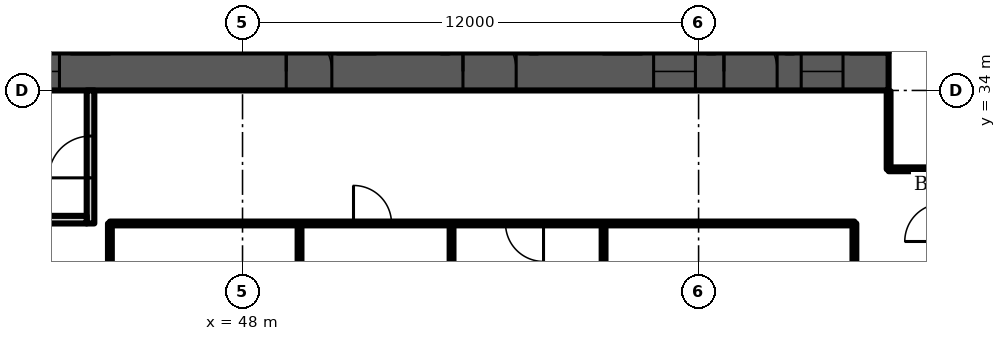
"""IFC4 building model, lengths in metres.
Left out: names, types, materials, properties, quantities, classifications, styles, units other than length and angle.
Written with IfcOpenShell. Run it as: python <this file> out.ifc"""

import sys

from ifc_helpers import new_model, si_unit, direction, frame, frame_2d, origin, place, context, subcontext, project, spatial, rectangle, extrude, element, fill, save


model = new_model("IFC4")
c1 = context("Model", 3, precision=1e-05, world=origin(), true_north=direction((0.0, 1.0)))
c2 = subcontext(c1, "Body", "Model", "MODEL_VIEW")
j1 = project(units=[si_unit("LENGTHUNIT", "METRE"), si_unit("PLANEANGLEUNIT", "RADIAN")], contexts=[c1])
p1 = place(None, origin())
s1 = spatial("IfcSite", under=j1, at=p1, CompositionType="ELEMENT")
p2 = place(p1, origin())
s2 = spatial("IfcBuilding", under=s1, at=p2, CompositionType="ELEMENT")
p3 = place(p2, frame((0.0, 0.0, 121.9)))
s3 = spatial("IfcBuildingStorey", under=s2, at=p3, CompositionType="ELEMENT", Elevation=121.9)
p4 = place(p3, frame((16.0, 34.5, 0.0), z_axis=(0.0, 0.0, 1.0), x_axis=(1.0, 0.0, 0.0)))
e1 = element("IfcWall", 1, at=p4, inside=s3, PredefinedType="SHEAR", context=c2, shape_type="SweptSolid", body=[
    extrude(rectangle(XDim=49.0, YDim=1.0, at=frame_2d((24.5, 0.0))), origin(), (0.0, 0.0, 1.0), 3.6),
])
p5 = place(p4, frame((1.2, 0.0, 0.0)))
e2 = element("IfcOpeningElement", 2, at=p5, cuts=e1, PredefinedType="OPENING", context=c2, shape_type="SweptSolid", body=[
    extrude(rectangle(XDim=1.1, YDim=2.1, at=frame_2d((0.55, 1.05))), frame((0.0, 0.51, 0.0), z_axis=(0.0, -1.0, 0.0), x_axis=(1.0, 0.0, 0.0)), (0.0, 0.0, 1.0), 1.02),
])
p6 = place(p4, frame((5.083, 0.0, 0.0)))
e3 = element("IfcOpeningElement", 3, at=p6, cuts=e1, PredefinedType="OPENING", context=c2, shape_type="SweptSolid", body=[
    extrude(rectangle(XDim=1.1, YDim=2.1, at=frame_2d((0.55, 1.05))), frame((0.0, 0.51, 0.0), z_axis=(0.0, -1.0, 0.0), x_axis=(1.0, 0.0, 0.0)), (0.0, 0.0, 1.0), 1.02),
])
p7 = place(p4, frame((2.933, 0.0, 0.0)))
e4 = element("IfcOpeningElement", 4, at=p7, cuts=e1, PredefinedType="OPENING", context=c2, shape_type="SweptSolid", body=[
    extrude(rectangle(XDim=1.4, YDim=2.1, at=frame_2d((0.7, 1.05))), frame((0.0, 0.51, 0.0), z_axis=(0.0, -1.0, 0.0), x_axis=(1.0, 0.0, 0.0)), (0.0, 0.0, 1.0), 1.02),
])
p8 = place(p4, frame((7.65, 0.0, 0.0)))
e5 = element("IfcOpeningElement", 5, at=p8, cuts=e1, PredefinedType="OPENING", context=c2, shape_type="SweptSolid", body=[
    extrude(rectangle(XDim=1.2, YDim=2.1, at=frame_2d((0.6, 1.05))), frame((0.0, 0.51, 0.0), z_axis=(0.0, -1.0, 0.0), x_axis=(1.0, 0.0, 0.0)), (0.0, 0.0, 1.0), 1.02),
])
p9 = place(p4, frame((14.817, 0.0, 0.0)))
e6 = element("IfcOpeningElement", 6, at=p9, cuts=e1, PredefinedType="OPENING", context=c2, shape_type="SweptSolid", body=[
    extrude(rectangle(XDim=1.1, YDim=2.1, at=frame_2d((0.55, 1.05))), frame((0.0, 0.51, 0.0), z_axis=(0.0, -1.0, 0.0), x_axis=(1.0, 0.0, 0.0)), (0.0, 0.0, 1.0), 1.02),
])
p10 = place(p4, frame((19.083, 0.0, 0.0)))
e7 = element("IfcOpeningElement", 7, at=p10, cuts=e1, PredefinedType="OPENING", context=c2, shape_type="SweptSolid", body=[
    extrude(rectangle(XDim=1.1, YDim=2.1, at=frame_2d((0.55, 1.05))), frame((0.0, 0.51, 0.0), z_axis=(0.0, -1.0, 0.0), x_axis=(1.0, 0.0, 0.0)), (0.0, 0.0, 1.0), 1.02),
])
p11 = place(p4, frame((16.8, 0.0, 0.0)))
e8 = element("IfcOpeningElement", 8, at=p11, cuts=e1, PredefinedType="OPENING", context=c2, shape_type="SweptSolid", body=[
    extrude(rectangle(XDim=1.4, YDim=2.1, at=frame_2d((0.7, 1.05))), frame((0.0, 0.51, 0.0), z_axis=(0.0, -1.0, 0.0), x_axis=(1.0, 0.0, 0.0)), (0.0, 0.0, 1.0), 1.02),
])
p12 = place(p4, frame((21.817, 0.0, 0.0)))
e9 = element("IfcOpeningElement", 9, at=p12, cuts=e1, PredefinedType="OPENING", context=c2, shape_type="SweptSolid", body=[
    extrude(rectangle(XDim=1.1, YDim=2.1, at=frame_2d((0.55, 1.05))), frame((0.0, 0.51, 0.0), z_axis=(0.0, -1.0, 0.0), x_axis=(1.0, 0.0, 0.0)), (0.0, 0.0, 1.0), 1.02),
])
p13 = place(p4, frame((26.083, 0.0, 0.0)))
e10 = element("IfcOpeningElement", 10, at=p13, cuts=e1, PredefinedType="OPENING", context=c2, shape_type="SweptSolid", body=[
    extrude(rectangle(XDim=1.1, YDim=2.1, at=frame_2d((0.55, 1.05))), frame((0.0, 0.51, 0.0), z_axis=(0.0, -1.0, 0.0), x_axis=(1.0, 0.0, 0.0)), (0.0, 0.0, 1.0), 1.02),
])
p14 = place(p4, frame((33.15, 0.0, 0.0)))
e11 = element("IfcOpeningElement", 11, at=p14, cuts=e1, PredefinedType="OPENING", context=c2, shape_type="SweptSolid", body=[
    extrude(rectangle(XDim=1.2, YDim=2.1, at=frame_2d((0.6, 1.05))), frame((0.0, 0.51, 0.0), z_axis=(0.0, -1.0, 0.0), x_axis=(1.0, 0.0, 0.0)), (0.0, 0.0, 1.0), 1.02),
])
p15 = place(p4, frame((37.8, 0.0, 0.0)))
e12 = element("IfcOpeningElement", 12, at=p15, cuts=e1, PredefinedType="OPENING", context=c2, shape_type="SweptSolid", body=[
    extrude(rectangle(XDim=1.4, YDim=2.1, at=frame_2d((0.7, 1.05))), frame((0.0, 0.51, 0.0), z_axis=(0.0, -1.0, 0.0), x_axis=(1.0, 0.0, 0.0)), (0.0, 0.0, 1.0), 1.02),
])
p16 = place(p4, frame((42.817, 0.0, 0.0)))
e13 = element("IfcOpeningElement", 13, at=p16, cuts=e1, PredefinedType="OPENING", context=c2, shape_type="SweptSolid", body=[
    extrude(rectangle(XDim=1.1, YDim=2.1, at=frame_2d((0.55, 1.05))), frame((0.0, 0.51, 0.0), z_axis=(0.0, -1.0, 0.0), x_axis=(1.0, 0.0, 0.0)), (0.0, 0.0, 1.0), 1.02),
])
p17 = place(p4, frame((46.7, 0.0, 0.0)))
e14 = element("IfcOpeningElement", 14, at=p17, cuts=e1, PredefinedType="OPENING", context=c2, shape_type="SweptSolid", body=[
    extrude(rectangle(XDim=1.1, YDim=2.1, at=frame_2d((0.55, 1.05))), frame((0.0, 0.51, 0.0), z_axis=(0.0, -1.0, 0.0), x_axis=(1.0, 0.0, 0.0)), (0.0, 0.0, 1.0), 1.02),
])
p18 = place(p4, frame((44.667, 0.0, 0.0)))
e15 = element("IfcOpeningElement", 15, at=p18, cuts=e1, PredefinedType="OPENING", context=c2, shape_type="SweptSolid", body=[
    extrude(rectangle(XDim=1.4, YDim=2.1, at=frame_2d((0.7, 1.05))), frame((0.0, 0.51, 0.0), z_axis=(0.0, -1.0, 0.0), x_axis=(1.0, 0.0, 0.0)), (0.0, 0.0, 1.0), 1.02),
])
p19 = place(p3, frame((44.0, 30.5, 0.0), z_axis=(0.0, 0.0, 1.0), x_axis=(0.0, 1.0, 0.0)))
e16 = element("IfcWall", 16, at=p19, inside=s3, PredefinedType="PARTITIONING", context=c2, shape_type="SweptSolid", body=[
    extrude(rectangle(XDim=3.5, YDim=0.2, at=frame_2d((1.75, 0.0))), origin(), (0.0, 0.0, 1.0), 3.2),
])
p20 = place(p19, frame((1.2, 0.0, 0.0)))
e17 = element("IfcOpeningElement", 17, at=p20, cuts=e16, PredefinedType="OPENING", context=c2, shape_type="SweptSolid", body=[
    extrude(rectangle(XDim=1.1, YDim=2.1, at=frame_2d((0.55, 1.05))), frame((0.0, 0.11, 0.0), z_axis=(0.0, -1.0, 0.0), x_axis=(1.0, 0.0, 0.0)), (0.0, 0.0, 1.0), 0.22),
])
p21 = place(p3, frame((41.1, 30.6, 0.0), z_axis=(0.0, 0.0, 1.0), x_axis=(1.0, 0.0, 0.0)))
e18 = element("IfcWall", 18, at=p21, inside=s3, PredefinedType="PARTITIONING", context=c2, shape_type="SweptSolid", body=[
    extrude(rectangle(XDim=2.8, YDim=0.2, at=frame_2d((1.4, 0.0))), origin(), (0.0, 0.0, 1.0), 3.2),
])
p22 = place(p3, frame((44.51, 8.437, 0.0), z_axis=(0.0, 0.0, 1.0), x_axis=(0.0, 1.0, 0.0)))
e19 = element("IfcWall", 19, at=p22, inside=s3, PredefinedType="PARTITIONING", context=c2, shape_type="SweptSolid", body=[
    extrude(rectangle(XDim=22.063, YDim=0.1, at=frame_2d((11.031, 0.0))), origin(), (0.0, 0.0, 1.0), 3.2),
])
p23 = place(p22, frame((12.683, 0.0, 0.0)))
e20 = element("IfcOpeningElement", 20, at=p23, cuts=e19, PredefinedType="OPENING", context=c2, shape_type="SweptSolid", body=[
    extrude(rectangle(XDim=1.8, YDim=2.1, at=frame_2d((0.9, 1.05))), frame((0.0, 0.06, 0.0), z_axis=(0.0, -1.0, 0.0), x_axis=(1.0, 0.0, 0.0)), (0.0, 0.0, 1.0), 0.12),
])
p24 = place(p3, frame((44.51, 30.5, 0.0), z_axis=(0.0, 0.0, 1.0), x_axis=(1.0, 0.0, 0.0)))
e21 = element("IfcWall", 21, at=p24, inside=s3, PredefinedType="PARTITIONING", context=c2, shape_type="SweptSolid", body=[
    extrude(rectangle(XDim=19.59, YDim=0.1, at=frame_2d((9.795, 0.0))), origin(), (0.0, 0.0, 1.0), 3.2),
])
p25 = place(p24, frame((6.41, 0.0, 0.0)))
e22 = element("IfcOpeningElement", 22, at=p25, cuts=e21, PredefinedType="OPENING", context=c2, shape_type="SweptSolid", body=[
    extrude(rectangle(XDim=1.0, YDim=2.1, at=frame_2d((0.5, 1.05))), frame((0.0, 0.06, 0.0), z_axis=(0.0, -1.0, 0.0), x_axis=(1.0, 0.0, 0.0)), (0.0, 0.0, 1.0), 0.12),
])
p26 = place(p24, frame((10.41, 0.0, 0.0)))
e23 = element("IfcOpeningElement", 23, at=p26, cuts=e21, PredefinedType="OPENING", context=c2, shape_type="SweptSolid", body=[
    extrude(rectangle(XDim=1.0, YDim=2.1, at=frame_2d((0.5, 1.05))), frame((0.0, 0.06, 0.0), z_axis=(0.0, -1.0, 0.0), x_axis=(1.0, 0.0, 0.0)), (0.0, 0.0, 1.0), 0.12),
])
p27 = place(p3, frame((49.5, -1.498, 0.0), z_axis=(0.0, 0.0, 1.0), x_axis=(0.0, 1.0, 0.0)))
e24 = element("IfcWall", 24, at=p27, inside=s3, PredefinedType="PARTITIONING", context=c2, shape_type="SweptSolid", body=[
    extrude(rectangle(XDim=31.998, YDim=0.1, at=frame_2d((15.999, 0.0))), origin(), (0.0, 0.0, 1.0), 3.2),
])
p28 = place(p3, frame((53.5, -1.148, 0.0), z_axis=(0.0, 0.0, 1.0), x_axis=(0.0, 1.0, 0.0)))
e25 = element("IfcWall", 25, at=p28, inside=s3, PredefinedType="PARTITIONING", context=c2, shape_type="SweptSolid", body=[
    extrude(rectangle(XDim=31.648, YDim=0.1, at=frame_2d((15.824, 0.0))), origin(), (0.0, 0.0, 1.0), 2.58),
])
p29 = place(p3, frame((57.5, -0.798, 0.0), z_axis=(0.0, 0.0, 1.0), x_axis=(0.0, 1.0, 0.0)))
e26 = element("IfcWall", 26, at=p29, inside=s3, PredefinedType="PARTITIONING", context=c2, shape_type="SweptSolid", body=[
    extrude(rectangle(XDim=31.298, YDim=0.1, at=frame_2d((15.649, 0.0))), origin(), (0.0, 0.0, 1.0), 2.58),
])
p30 = place(p3, frame((64.1, 10.095, 0.0), z_axis=(0.0, 0.0, 1.0), x_axis=(0.0, 1.0, 0.0)))
e27 = element("IfcWall", 27, at=p30, inside=s3, PredefinedType="PARTITIONING", context=c2, shape_type="SweptSolid", body=[
    extrude(rectangle(XDim=20.405, YDim=0.1, at=frame_2d((10.203, 0.0))), origin(), (0.0, 0.0, 1.0), 3.2),
])
p31 = place(p30, frame((8.905, 0.0, 0.0)))
e28 = element("IfcOpeningElement", 28, at=p31, cuts=e27, PredefinedType="OPENING", context=c2, shape_type="SweptSolid", body=[
    extrude(rectangle(XDim=1.0, YDim=2.1, at=frame_2d((0.5, 1.05))), frame((0.0, 0.06, 0.0), z_axis=(0.0, -1.0, 0.0), x_axis=(1.0, 0.0, 0.0)), (0.0, 0.0, 1.0), 0.12),
])
p32 = place(p3, frame((65.0, 31.925, 0.0), z_axis=(0.0, 0.0, 1.0), x_axis=(0.0, 1.0, 0.0)))
e29 = element("IfcWall", 29, at=p32, inside=s3, PredefinedType="PARTITIONING", context=c2, shape_type="SweptSolid", body=[
    extrude(rectangle(XDim=2.055, YDim=0.1, at=frame_2d((1.027, 0.0))), origin(), (0.0, 0.0, 1.0), 3.2),
])
p33 = place(p3, frame((65.0, 31.925, 0.0), z_axis=(0.0, 0.0, 1.0), x_axis=(1.0, 0.0, 0.0)))
e30 = element("IfcWall", 30, at=p33, inside=s3, PredefinedType="PARTITIONING", context=c2, shape_type="SweptSolid", body=[
    extrude(rectangle(XDim=1.425, YDim=0.1, at=frame_2d((0.712, 0.0))), origin(), (0.0, 0.0, 1.0), 3.2),
])
p34 = place(p3, frame((65.9, 27.435, 0.0), z_axis=(0.0, 0.0, 1.0), x_axis=(0.178584, 0.983924, 0.0)))
e31 = element("IfcWall", 31, at=p34, inside=s3, PredefinedType="PARTITIONING", context=c2, shape_type="SweptSolid", body=[
    extrude(rectangle(XDim=2.353, YDim=0.1, at=frame_2d((1.176, 0.0))), origin(), (0.0, 0.0, 1.0), 3.2),
])
p35 = place(p13, origin())
e32 = element("IfcDoor", 32, at=p35, inside=s3, OperationType="DOUBLE_DOOR_SLIDING", PredefinedType="DOOR", context=c2, shape_type="SweptSolid", body=[
    extrude(rectangle(XDim=1.1, YDim=2.1, at=frame_2d((0.55, 1.05))), frame((0.0, 0.025, 0.0), z_axis=(0.0, -1.0, 0.0), x_axis=(1.0, 0.0, 0.0)), (0.0, 0.0, 1.0), 0.05),
])
fill(e10, e32)
p36 = place(p14, origin())
e33 = element("IfcDoor", 33, at=p36, inside=s3, OperationType="SINGLE_SWING_LEFT", PredefinedType="DOOR", context=c2, shape_type="SweptSolid", body=[
    extrude(rectangle(XDim=1.2, YDim=2.1, at=frame_2d((0.6, 1.05))), frame((0.0, 0.025, 0.0), z_axis=(0.0, -1.0, 0.0), x_axis=(1.0, 0.0, 0.0)), (0.0, 0.0, 1.0), 0.05),
])
fill(e11, e33)
p37 = place(p15, origin())
e34 = element("IfcDoor", 34, at=p37, inside=s3, OperationType="DOUBLE_DOOR_SINGLE_SWING", PredefinedType="DOOR", context=c2, shape_type="SweptSolid", body=[
    extrude(rectangle(XDim=1.4, YDim=2.1, at=frame_2d((0.7, 1.05))), frame((0.0, 0.025, 0.0), z_axis=(0.0, -1.0, 0.0), x_axis=(1.0, 0.0, 0.0)), (0.0, 0.0, 1.0), 0.05),
])
fill(e12, e34)
p38 = place(p16, origin())
e35 = element("IfcDoor", 35, at=p38, inside=s3, OperationType="DOUBLE_DOOR_SLIDING", PredefinedType="DOOR", context=c2, shape_type="SweptSolid", body=[
    extrude(rectangle(XDim=1.1, YDim=2.1, at=frame_2d((0.55, 1.05))), frame((0.0, 0.025, 0.0), z_axis=(0.0, -1.0, 0.0), x_axis=(1.0, 0.0, 0.0)), (0.0, 0.0, 1.0), 0.05),
])
fill(e13, e35)
p39 = place(p17, origin())
e36 = element("IfcDoor", 36, at=p39, inside=s3, OperationType="DOUBLE_DOOR_SLIDING", PredefinedType="DOOR", context=c2, shape_type="SweptSolid", body=[
    extrude(rectangle(XDim=1.1, YDim=2.1, at=frame_2d((0.55, 1.05))), frame((0.0, 0.025, 0.0), z_axis=(0.0, -1.0, 0.0), x_axis=(1.0, 0.0, 0.0)), (0.0, 0.0, 1.0), 0.05),
])
fill(e14, e36)
p40 = place(p18, origin())
e37 = element("IfcDoor", 37, at=p40, inside=s3, OperationType="DOUBLE_DOOR_SINGLE_SWING", PredefinedType="DOOR", context=c2, shape_type="SweptSolid", body=[
    extrude(rectangle(XDim=1.4, YDim=2.1, at=frame_2d((0.7, 1.05))), frame((0.0, 0.025, 0.0), z_axis=(0.0, -1.0, 0.0), x_axis=(1.0, 0.0, 0.0)), (0.0, 0.0, 1.0), 0.05),
])
fill(e15, e37)
p41 = place(p20, origin())
e38 = element("IfcDoor", 38, at=p41, inside=s3, OperationType="SINGLE_SWING_LEFT", PredefinedType="DOOR", context=c2, shape_type="SweptSolid", body=[
    extrude(rectangle(XDim=1.1, YDim=2.1, at=frame_2d((0.55, 1.05))), frame((0.0, 0.025, 0.0), z_axis=(0.0, -1.0, 0.0), x_axis=(1.0, 0.0, 0.0)), (0.0, 0.0, 1.0), 0.05),
])
fill(e17, e38)
p42 = place(p25, origin())
e39 = element("IfcDoor", 39, at=p42, inside=s3, OperationType="SINGLE_SWING_LEFT", PredefinedType="DOOR", context=c2, shape_type="SweptSolid", body=[
    extrude(rectangle(XDim=1.0, YDim=2.1, at=frame_2d((0.5, 1.05))), frame((0.0, 0.025, 0.0), z_axis=(0.0, -1.0, 0.0), x_axis=(1.0, 0.0, 0.0)), (0.0, 0.0, 1.0), 0.05),
])
fill(e22, e39)
p43 = place(p26, origin())
e40 = element("IfcDoor", 40, at=p43, inside=s3, OperationType="SINGLE_SWING_RIGHT", PredefinedType="DOOR", context=c2, shape_type="SweptSolid", body=[
    extrude(rectangle(XDim=1.0, YDim=2.1, at=frame_2d((0.5, 1.05))), frame((0.0, 0.025, 0.0), z_axis=(0.0, -1.0, 0.0), x_axis=(1.0, 0.0, 0.0)), (0.0, 0.0, 1.0), 0.05),
])
fill(e23, e40)
save(model, sys.argv[1])
